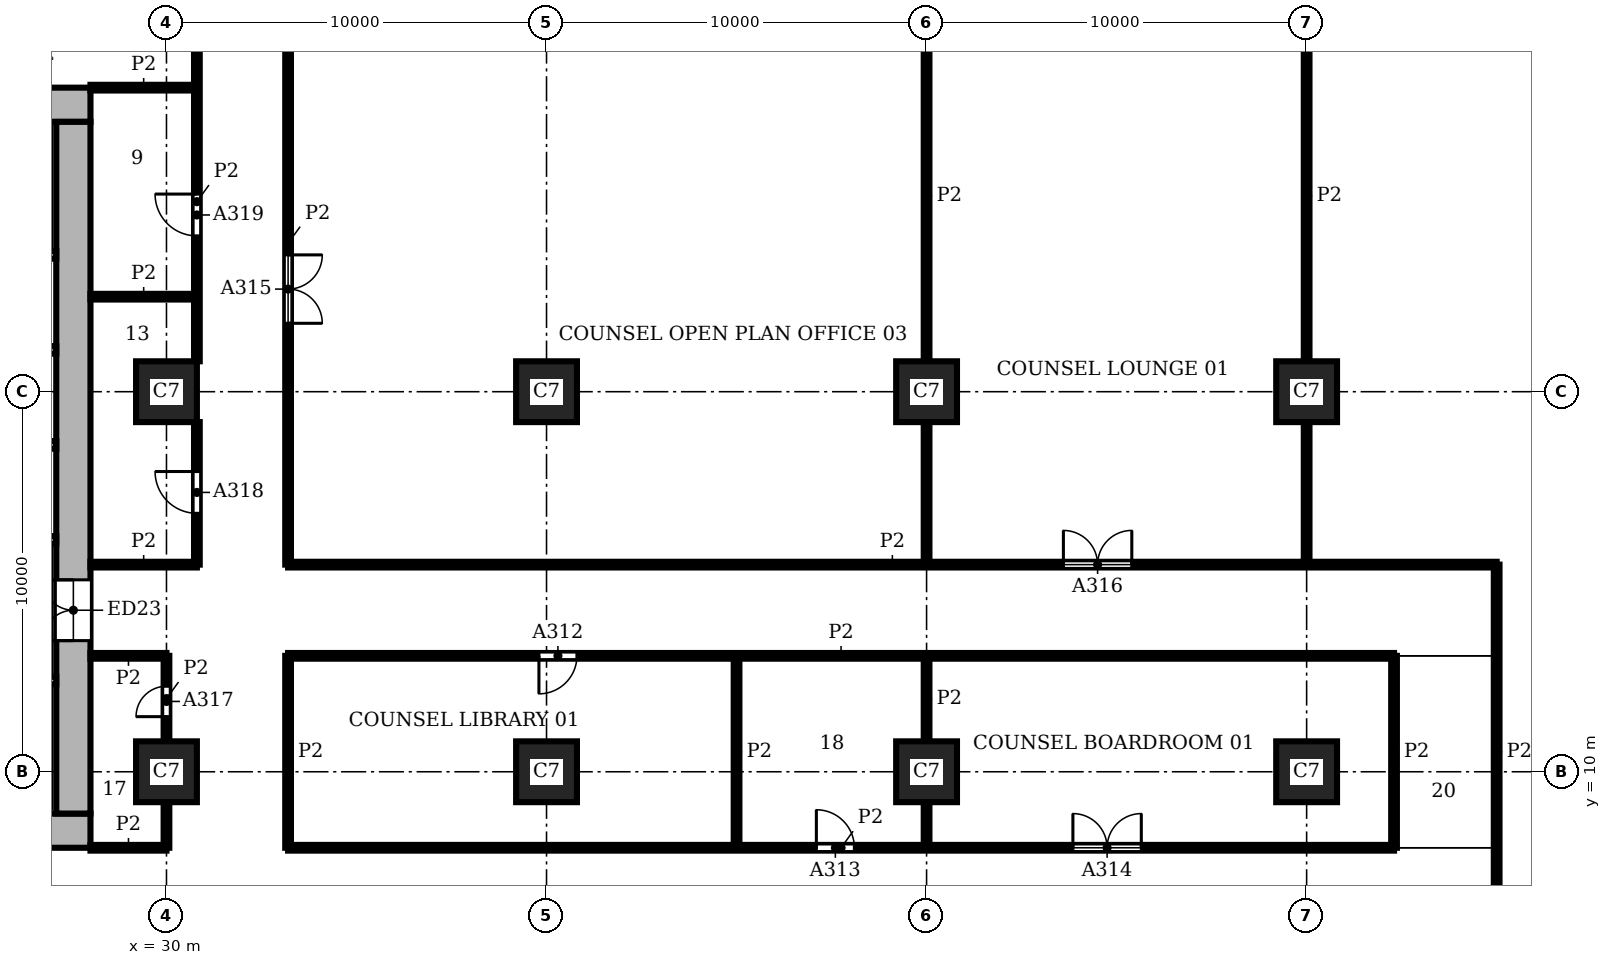
"""IFC4 building model, lengths in metres.
Left out: names, types, materials, properties, quantities, classifications, styles, units other than length and angle.
Written with IfcOpenShell. Run it as: python <this file> out.ifc"""

import sys

from ifc_helpers import new_model, si_unit, direction, frame, frame_2d, origin, origin_2d, place, context, subcontext, project, spatial, rectangle, extrude, element, fill, save


model = new_model("IFC4")
c1 = context("Model", 3, precision=1e-05, world=origin(), true_north=direction((0.0, 1.0)))
c2 = subcontext(c1, "Body", "Model", "MODEL_VIEW")
j1 = project(units=[si_unit("LENGTHUNIT", "METRE"), si_unit("PLANEANGLEUNIT", "RADIAN")], contexts=[c1])
p1 = place(None, origin())
s1 = spatial("IfcSite", under=j1, at=p1, CompositionType="ELEMENT")
p2 = place(p1, origin())
s2 = spatial("IfcBuilding", under=s1, at=p2, CompositionType="ELEMENT")
p3 = place(p2, frame((0.0, 0.0, 35.4)))
s3 = spatial("IfcBuildingStorey", under=s2, at=p3, CompositionType="ELEMENT", Elevation=35.4)
for number, where, z_axis, x_axis in (
    (1, (30.0, 10.0, 0.0), (0.0, 0.0, 1.0), (1.0, 0.0, 0.0)),
    (2, (30.0, 20.0, 0.0), (0.0, 0.0, 1.0), (1.0, 0.0, 0.0)),
    (3, (40.0, 10.0, 0.0), (0.0, 0.0, 1.0), (1.0, 0.0, 0.0)),
    (4, (40.0, 20.0, 0.0), (0.0, 0.0, 1.0), (1.0, 0.0, 0.0)),
    (5, (50.0, 10.0, 0.0), (0.0, 0.0, 1.0), (1.0, 0.0, 0.0)),
    (6, (50.0, 20.0, 0.0), (0.0, 0.0, 1.0), (1.0, 0.0, 0.0)),
    (7, (60.0, 10.0, 0.0), (0.0, 0.0, 1.0), (1.0, 0.0, 0.0)),
    (8, (60.0, 20.0, 0.0), (0.0, 0.0, 1.0), (1.0, 0.0, 0.0)),
):
    element("IfcColumn", number, at=place(p3, frame(where, z_axis=z_axis, x_axis=x_axis)), inside=s3, PredefinedType="COLUMN", context=c2, shape_type="SweptSolid", body=[
        extrude(rectangle(XDim=1.6, YDim=1.6, at=origin_2d()), origin(), (0.0, 0.0, 1.0), 3.9),
    ])
p4 = place(p3, frame((8.0, 8.45, 0.0), z_axis=(0.0, 0.0, 1.0), x_axis=(1.0, 0.0, 0.0)))
e9 = element("IfcWall", 9, at=p4, inside=s3, PredefinedType="SHEAR", context=c2, shape_type="SweptSolid", body=[
    extrude(rectangle(XDim=20.0, YDim=0.9, at=frame_2d((10.0, 0.0))), origin(), (0.0, 0.0, 1.0), 3.9),
])
p5 = place(p3, frame((27.55, 8.9, 0.0), z_axis=(0.0, 0.0, 1.0), x_axis=(0.0, 1.0, 0.0)))
e10 = element("IfcWall", 10, at=p5, inside=s3, PredefinedType="SHEAR", context=c2, shape_type="SweptSolid", body=[
    extrude(rectangle(XDim=18.2, YDim=0.9, at=frame_2d((9.1, 0.0))), origin(), (0.0, 0.0, 1.0), 3.9),
])
p6 = place(p5, frame((4.55, 0.0, 0.0)))
e11 = element("IfcOpeningElement", 11, at=p6, cuts=e10, PredefinedType="OPENING", context=c2, shape_type="SweptSolid", body=[
    extrude(rectangle(XDim=1.6, YDim=2.1, at=frame_2d((0.8, 1.05))), frame((0.0, 0.46, 0.0), z_axis=(0.0, -1.0, 0.0), x_axis=(1.0, 0.0, 0.0)), (0.0, 0.0, 1.0), 0.92),
])
p7 = place(p3, frame((28.0, 27.55, 0.0), z_axis=(0.0, 0.0, 1.0), x_axis=(-1.0, 0.0, 0.0)))
e12 = element("IfcWall", 12, at=p7, inside=s3, PredefinedType="SHEAR", context=c2, shape_type="SweptSolid", body=[
    extrude(rectangle(XDim=20.0, YDim=0.9, at=frame_2d((10.0, 0.0))), origin(), (0.0, 0.0, 1.0), 3.9),
])
p8 = place(p3, frame((13.8, 12.4, 0.0), z_axis=(0.0, 0.0, 1.0), x_axis=(1.0, 0.0, 0.0)))
e13 = element("IfcWall", 13, at=p8, inside=s3, PredefinedType="SHEAR", context=c2, shape_type="SweptSolid", body=[
    extrude(rectangle(XDim=13.3, YDim=0.2, at=frame_2d((6.65, 0.0))), origin(), (0.0, 0.0, 1.0), 3.58),
])
p9 = place(p8, frame((2.4, 0.0, 0.0)))
e14 = element("IfcOpeningElement", 14, at=p9, cuts=e13, PredefinedType="OPENING", context=c2, shape_type="SweptSolid", body=[
    extrude(rectangle(XDim=1.1, YDim=2.1, at=frame_2d((0.55, 1.05))), frame((0.0, 0.11, 0.0), z_axis=(0.0, -1.0, 0.0), x_axis=(1.0, 0.0, 0.0)), (0.0, 0.0, 1.0), 0.22),
])
p10 = place(p8, frame((4.9, 0.0, 0.0)))
e15 = element("IfcOpeningElement", 15, at=p10, cuts=e13, PredefinedType="OPENING", context=c2, shape_type="SweptSolid", body=[
    extrude(rectangle(XDim=1.1, YDim=2.1, at=frame_2d((0.55, 1.05))), frame((0.0, 0.11, 0.0), z_axis=(0.0, -1.0, 0.0), x_axis=(1.0, 0.0, 0.0)), (0.0, 0.0, 1.0), 0.22),
])
p11 = place(p8, frame((0.25, 0.0, 0.0)))
e16 = element("IfcOpeningElement", 16, at=p11, cuts=e13, PredefinedType="OPENING", context=c2, shape_type="SweptSolid", body=[
    extrude(rectangle(XDim=1.0, YDim=2.1, at=frame_2d((0.5, 1.05))), frame((0.0, 0.11, 0.0), z_axis=(0.0, -1.0, 0.0), x_axis=(1.0, 0.0, 0.0)), (0.0, 0.0, 1.0), 0.22),
])
for number, where, z_axis, x_axis in (
    (17, (24.3, 16.1, 0.0), (0.0, 0.0, 1.0), (1.0, 0.0, 0.0)),
    (18, (24.3, 18.6, 0.0), (0.0, 0.0, 1.0), (1.0, 0.0, 0.0)),
    (19, (24.3, 21.1, 0.0), (0.0, 0.0, 1.0), (1.0, 0.0, 0.0)),
):
    element("IfcWall", number, at=place(p3, frame(where, z_axis=z_axis, x_axis=x_axis)), inside=s3, PredefinedType="SHEAR", context=c2, shape_type="SweptSolid", body=[
        extrude(rectangle(XDim=2.8, YDim=0.2, at=frame_2d((1.4, 0.0))), origin(), (0.0, 0.0, 1.0), 3.58),
    ])
p12 = place(p3, frame((13.8, 23.6, 0.0), z_axis=(0.0, 0.0, 1.0), x_axis=(1.0, 0.0, 0.0)))
e20 = element("IfcWall", 20, at=p12, inside=s3, PredefinedType="SHEAR", context=c2, shape_type="SweptSolid", body=[
    extrude(rectangle(XDim=13.3, YDim=0.2, at=frame_2d((6.65, 0.0))), origin(), (0.0, 0.0, 1.0), 3.58),
])
p13 = place(p12, frame((2.4, 0.0, 0.0)))
e21 = element("IfcOpeningElement", 21, at=p13, cuts=e20, PredefinedType="OPENING", context=c2, shape_type="SweptSolid", body=[
    extrude(rectangle(XDim=1.1, YDim=2.1, at=frame_2d((0.55, 1.05))), frame((0.0, 0.11, 0.0), z_axis=(0.0, -1.0, 0.0), x_axis=(1.0, 0.0, 0.0)), (0.0, 0.0, 1.0), 0.22),
])
p14 = place(p12, frame((4.9, 0.0, 0.0)))
e22 = element("IfcOpeningElement", 22, at=p14, cuts=e20, PredefinedType="OPENING", context=c2, shape_type="SweptSolid", body=[
    extrude(rectangle(XDim=1.1, YDim=2.1, at=frame_2d((0.55, 1.05))), frame((0.0, 0.11, 0.0), z_axis=(0.0, -1.0, 0.0), x_axis=(1.0, 0.0, 0.0)), (0.0, 0.0, 1.0), 0.22),
])
p15 = place(p12, frame((0.25, 0.0, 0.0)))
e23 = element("IfcOpeningElement", 23, at=p15, cuts=e20, PredefinedType="OPENING", context=c2, shape_type="SweptSolid", body=[
    extrude(rectangle(XDim=1.0, YDim=2.1, at=frame_2d((0.5, 1.05))), frame((0.0, 0.11, 0.0), z_axis=(0.0, -1.0, 0.0), x_axis=(1.0, 0.0, 0.0)), (0.0, 0.0, 1.0), 0.22),
])
p16 = place(p3, frame((30.0, 8.0, 0.0), z_axis=(0.0, 0.0, 1.0), x_axis=(0.0, 1.0, 0.0)))
e24 = element("IfcWall", 24, at=p16, inside=s3, PredefinedType="PARTITIONING", context=c2, shape_type="SweptSolid", body=[
    extrude(rectangle(XDim=1.2, YDim=0.15, at=frame_2d((0.6, 0.0))), origin(), (0.0, 0.0, 1.0), 3.58),
])
p17 = place(p3, frame((30.0, 10.8, 0.0), z_axis=(0.0, 0.0, 1.0), x_axis=(0.0, 1.0, 0.0)))
e25 = element("IfcWall", 25, at=p17, inside=s3, PredefinedType="PARTITIONING", context=c2, shape_type="SweptSolid", body=[
    extrude(rectangle(XDim=2.25, YDim=0.15, at=frame_2d((1.125, 0.0))), origin(), (0.0, 0.0, 1.0), 3.58),
])
p18 = place(p17, frame((0.65, 0.0, 0.0)))
e26 = element("IfcOpeningElement", 26, at=p18, cuts=e25, PredefinedType="OPENING", context=c2, shape_type="SweptSolid", body=[
    extrude(rectangle(XDim=0.8, YDim=2.1, at=frame_2d((0.4, 1.05))), frame((0.0, 0.085, 0.0), z_axis=(0.0, -1.0, 0.0), x_axis=(1.0, 0.0, 0.0)), (0.0, 0.0, 1.0), 0.17),
])
p19 = place(p3, frame((30.8, 15.45, 0.0), z_axis=(0.0, 0.0, 1.0), x_axis=(0.0, 1.0, 0.0)))
e27 = element("IfcWall", 27, at=p19, inside=s3, PredefinedType="PARTITIONING", context=c2, shape_type="SweptSolid", body=[
    extrude(rectangle(XDim=3.75, YDim=0.15, at=frame_2d((1.875, 0.0))), origin(), (0.0, 0.0, 1.0), 3.58),
])
p20 = place(p19, frame((1.35, 0.0, 0.0)))
e28 = element("IfcOpeningElement", 28, at=p20, cuts=e27, PredefinedType="OPENING", context=c2, shape_type="SweptSolid", body=[
    extrude(rectangle(XDim=1.1, YDim=2.1, at=frame_2d((0.55, 1.05))), frame((0.0, 0.085, 0.0), z_axis=(0.0, -1.0, 0.0), x_axis=(1.0, 0.0, 0.0)), (0.0, 0.0, 1.0), 0.17),
])
p21 = place(p3, frame((30.8, 20.8, 0.0), z_axis=(0.0, 0.0, 1.0), x_axis=(0.0, 1.0, 0.0)))
e29 = element("IfcWall", 29, at=p21, inside=s3, PredefinedType="PARTITIONING", context=c2, shape_type="SweptSolid", body=[
    extrude(rectangle(XDim=8.4, YDim=0.15, at=frame_2d((4.2, 0.0))), origin(), (0.0, 0.0, 1.0), 3.58),
])
p22 = place(p21, frame((3.3, 0.0, 0.0)))
e30 = element("IfcOpeningElement", 30, at=p22, cuts=e29, PredefinedType="OPENING", context=c2, shape_type="SweptSolid", body=[
    extrude(rectangle(XDim=1.1, YDim=2.1, at=frame_2d((0.55, 1.05))), frame((0.0, 0.085, 0.0), z_axis=(0.0, -1.0, 0.0), x_axis=(1.0, 0.0, 0.0)), (0.0, 0.0, 1.0), 0.17),
])
p23 = place(p3, frame((33.2, 8.0, 0.0), z_axis=(0.0, 0.0, 1.0), x_axis=(0.0, 1.0, 0.0)))
e31 = element("IfcWall", 31, at=p23, inside=s3, PredefinedType="PARTITIONING", context=c2, shape_type="SweptSolid", body=[
    extrude(rectangle(XDim=5.05, YDim=0.15, at=frame_2d((2.525, 0.0))), origin(), (0.0, 0.0, 1.0), 3.58),
])
p24 = place(p3, frame((33.2, 15.45, 0.0), z_axis=(0.0, 0.0, 1.0), x_axis=(0.0, 1.0, 0.0)))
e32 = element("IfcWall", 32, at=p24, inside=s3, PredefinedType="PARTITIONING", context=c2, shape_type="SweptSolid", body=[
    extrude(rectangle(XDim=16.912, YDim=0.15, at=frame_2d((8.456, 0.0))), origin(), (0.0, 0.0, 1.0), 3.58),
])
p25 = place(p24, frame((6.35, 0.0, 0.0)))
e33 = element("IfcOpeningElement", 33, at=p25, cuts=e32, PredefinedType="OPENING", context=c2, shape_type="SweptSolid", body=[
    extrude(rectangle(XDim=1.8, YDim=2.1, at=frame_2d((0.9, 1.05))), frame((0.0, 0.085, 0.0), z_axis=(0.0, -1.0, 0.0), x_axis=(1.0, 0.0, 0.0)), (0.0, 0.0, 1.0), 0.17),
])
p26 = place(p3, frame((45.0, 8.0, 0.0), z_axis=(0.0, 0.0, 1.0), x_axis=(0.0, 1.0, 0.0)))
e34 = element("IfcWall", 34, at=p26, inside=s3, PredefinedType="PARTITIONING", context=c2, shape_type="SweptSolid", body=[
    extrude(rectangle(XDim=5.05, YDim=0.15, at=frame_2d((2.525, 0.0))), origin(), (0.0, 0.0, 1.0), 3.58),
])
p27 = place(p3, frame((50.0, 8.0, 0.0), z_axis=(0.0, 0.0, 1.0), x_axis=(0.0, 1.0, 0.0)))
e35 = element("IfcWall", 35, at=p27, inside=s3, PredefinedType="PARTITIONING", context=c2, shape_type="SweptSolid", body=[
    extrude(rectangle(XDim=1.2, YDim=0.15, at=frame_2d((0.6, 0.0))), origin(), (0.0, 0.0, 1.0), 3.58),
])
p28 = place(p3, frame((50.0, 10.8, 0.0), z_axis=(0.0, 0.0, 1.0), x_axis=(0.0, 1.0, 0.0)))
e36 = element("IfcWall", 36, at=p28, inside=s3, PredefinedType="PARTITIONING", context=c2, shape_type="SweptSolid", body=[
    extrude(rectangle(XDim=2.25, YDim=0.15, at=frame_2d((1.125, 0.0))), origin(), (0.0, 0.0, 1.0), 3.58),
])
p29 = place(p3, frame((50.0, 15.45, 0.0), z_axis=(0.0, 0.0, 1.0), x_axis=(0.0, 1.0, 0.0)))
e37 = element("IfcWall", 37, at=p29, inside=s3, PredefinedType="PARTITIONING", context=c2, shape_type="SweptSolid", body=[
    extrude(rectangle(XDim=3.75, YDim=0.15, at=frame_2d((1.875, 0.0))), origin(), (0.0, 0.0, 1.0), 3.58),
])
p30 = place(p3, frame((50.0, 20.8, 0.0), z_axis=(0.0, 0.0, 1.0), x_axis=(0.0, 1.0, 0.0)))
e38 = element("IfcWall", 38, at=p30, inside=s3, PredefinedType="PARTITIONING", context=c2, shape_type="SweptSolid", body=[
    extrude(rectangle(XDim=8.7, YDim=0.15, at=frame_2d((4.35, 0.0))), origin(), (0.0, 0.0, 1.0), 3.58),
])
p31 = place(p3, frame((60.0, 15.45, 0.0), z_axis=(0.0, 0.0, 1.0), x_axis=(0.0, 1.0, 0.0)))
e39 = element("IfcWall", 39, at=p31, inside=s3, PredefinedType="PARTITIONING", context=c2, shape_type="SweptSolid", body=[
    extrude(rectangle(XDim=3.75, YDim=0.15, at=frame_2d((1.875, 0.0))), origin(), (0.0, 0.0, 1.0), 3.58),
])
p32 = place(p3, frame((60.0, 20.8, 0.0), z_axis=(0.0, 0.0, 1.0), x_axis=(0.0, 1.0, 0.0)))
e40 = element("IfcWall", 40, at=p32, inside=s3, PredefinedType="PARTITIONING", context=c2, shape_type="SweptSolid", body=[
    extrude(rectangle(XDim=8.7, YDim=0.15, at=frame_2d((4.35, 0.0))), origin(), (0.0, 0.0, 1.0), 3.58),
])
p33 = place(p3, frame((62.3, 8.0, 0.0), z_axis=(0.0, 0.0, 1.0), x_axis=(0.0, 1.0, 0.0)))
e41 = element("IfcWall", 41, at=p33, inside=s3, PredefinedType="PARTITIONING", context=c2, shape_type="SweptSolid", body=[
    extrude(rectangle(XDim=5.05, YDim=0.15, at=frame_2d((2.525, 0.0))), origin(), (0.0, 0.0, 1.0), 3.58),
])
p34 = place(p3, frame((65.0, 5.6, 0.0), z_axis=(0.0, 0.0, 1.0), x_axis=(0.0, 1.0, 0.0)))
e42 = element("IfcWall", 42, at=p34, inside=s3, PredefinedType="PARTITIONING", context=c2, shape_type="SweptSolid", body=[
    extrude(rectangle(XDim=9.85, YDim=0.15, at=frame_2d((4.925, 0.0))), origin(), (0.0, 0.0, 1.0), 3.58),
])
p35 = place(p3, frame((28.0, 8.0, 0.0), z_axis=(0.0, 0.0, 1.0), x_axis=(1.0, 0.0, 0.0)))
e43 = element("IfcWall", 43, at=p35, inside=s3, PredefinedType="PARTITIONING", context=c2, shape_type="SweptSolid", body=[
    extrude(rectangle(XDim=2.0, YDim=0.15, at=frame_2d((1.0, 0.0))), origin(), (0.0, 0.0, 1.0), 3.58),
])
p36 = place(p3, frame((33.2, 8.0, 0.0), z_axis=(0.0, 0.0, 1.0), x_axis=(1.0, 0.0, 0.0)))
e44 = element("IfcWall", 44, at=p36, inside=s3, PredefinedType="PARTITIONING", context=c2, shape_type="SweptSolid", body=[
    extrude(rectangle(XDim=29.1, YDim=0.15, at=frame_2d((14.55, 0.0))), origin(), (0.0, 0.0, 1.0), 3.58),
])
p37 = place(p36, frame((13.9, 0.0, 0.0)))
e45 = element("IfcOpeningElement", 45, at=p37, cuts=e44, PredefinedType="OPENING", context=c2, shape_type="SweptSolid", body=[
    extrude(rectangle(XDim=1.0, YDim=2.1, at=frame_2d((0.5, 1.05))), frame((0.0, 0.085, 0.0), z_axis=(0.0, -1.0, 0.0), x_axis=(1.0, 0.0, 0.0)), (0.0, 0.0, 1.0), 0.17),
])
p38 = place(p36, frame((20.65, 0.0, 0.0)))
e46 = element("IfcOpeningElement", 46, at=p38, cuts=e44, PredefinedType="OPENING", context=c2, shape_type="SweptSolid", body=[
    extrude(rectangle(XDim=1.8, YDim=2.1, at=frame_2d((0.9, 1.05))), frame((0.0, 0.085, 0.0), z_axis=(0.0, -1.0, 0.0), x_axis=(1.0, 0.0, 0.0)), (0.0, 0.0, 1.0), 0.17),
])
p39 = place(p3, frame((28.0, 13.05, 0.0), z_axis=(0.0, 0.0, 1.0), x_axis=(1.0, 0.0, 0.0)))
e47 = element("IfcWall", 47, at=p39, inside=s3, PredefinedType="PARTITIONING", context=c2, shape_type="SweptSolid", body=[
    extrude(rectangle(XDim=2.0, YDim=0.15, at=frame_2d((1.0, 0.0))), origin(), (0.0, 0.0, 1.0), 3.58),
])
p40 = place(p3, frame((33.2, 13.05, 0.0), z_axis=(0.0, 0.0, 1.0), x_axis=(1.0, 0.0, 0.0)))
e48 = element("IfcWall", 48, at=p40, inside=s3, PredefinedType="PARTITIONING", context=c2, shape_type="SweptSolid", body=[
    extrude(rectangle(XDim=29.1, YDim=0.15, at=frame_2d((14.55, 0.0))), origin(), (0.0, 0.0, 1.0), 3.58),
])
p41 = place(p40, frame((6.6, 0.0, 0.0)))
e49 = element("IfcOpeningElement", 49, at=p41, cuts=e48, PredefinedType="OPENING", context=c2, shape_type="SweptSolid", body=[
    extrude(rectangle(XDim=1.0, YDim=2.1, at=frame_2d((0.5, 1.05))), frame((0.0, 0.085, 0.0), z_axis=(0.0, -1.0, 0.0), x_axis=(1.0, 0.0, 0.0)), (0.0, 0.0, 1.0), 0.17),
])
p42 = place(p3, frame((28.0, 15.45, 0.0), z_axis=(0.0, 0.0, 1.0), x_axis=(1.0, 0.0, 0.0)))
e50 = element("IfcWall", 50, at=p42, inside=s3, PredefinedType="PARTITIONING", context=c2, shape_type="SweptSolid", body=[
    extrude(rectangle(XDim=2.8, YDim=0.15, at=frame_2d((1.4, 0.0))), origin(), (0.0, 0.0, 1.0), 3.58),
])
p43 = place(p3, frame((33.2, 15.45, 0.0), z_axis=(0.0, 0.0, 1.0), x_axis=(1.0, 0.0, 0.0)))
e51 = element("IfcWall", 51, at=p43, inside=s3, PredefinedType="PARTITIONING", context=c2, shape_type="SweptSolid", body=[
    extrude(rectangle(XDim=31.8, YDim=0.15, at=frame_2d((15.9, 0.0))), origin(), (0.0, 0.0, 1.0), 3.58),
])
p44 = place(p43, frame((20.4, 0.0, 0.0)))
e52 = element("IfcOpeningElement", 52, at=p44, cuts=e51, PredefinedType="OPENING", context=c2, shape_type="SweptSolid", body=[
    extrude(rectangle(XDim=1.8, YDim=2.1, at=frame_2d((0.9, 1.05))), frame((0.0, 0.085, 0.0), z_axis=(0.0, -1.0, 0.0), x_axis=(1.0, 0.0, 0.0)), (0.0, 0.0, 1.0), 0.17),
])
for number, where, z_axis, x_axis in (
    (53, (28.0, 22.5, 0.0), (0.0, 0.0, 1.0), (1.0, 0.0, 0.0)),
    (54, (28.0, 28.0, 0.0), (0.0, 0.0, 1.0), (1.0, 0.0, 0.0)),
):
    element("IfcWall", number, at=place(p3, frame(where, z_axis=z_axis, x_axis=x_axis)), inside=s3, PredefinedType="PARTITIONING", context=c2, shape_type="SweptSolid", body=[
        extrude(rectangle(XDim=2.8, YDim=0.15, at=frame_2d((1.4, 0.0))), origin(), (0.0, 0.0, 1.0), 3.58),
    ])
p45 = place(p6, origin())
e55 = element("IfcDoor", 55, at=p45, inside=s3, OperationType="DOUBLE_DOOR_SINGLE_SWING", PredefinedType="DOOR", context=c2, shape_type="SweptSolid", body=[
    extrude(rectangle(XDim=1.6, YDim=2.1, at=frame_2d((0.8, 1.05))), frame((0.0, 0.025, 0.0), z_axis=(0.0, -1.0, 0.0), x_axis=(1.0, 0.0, 0.0)), (0.0, 0.0, 1.0), 0.05),
])
fill(e11, e55)
p46 = place(p41, frame((1.0, 0.0, 0.0), z_axis=(0.0, 0.0, 1.0), x_axis=(-1.0, 0.0, 0.0)))
e56 = element("IfcDoor", 56, at=p46, inside=s3, OperationType="SINGLE_SWING_RIGHT", PredefinedType="DOOR", context=c2, shape_type="SweptSolid", body=[
    extrude(rectangle(XDim=1.0, YDim=2.1, at=frame_2d((0.5, 1.05))), frame((0.0, 0.025, 0.0), z_axis=(0.0, -1.0, 0.0), x_axis=(1.0, 0.0, 0.0)), (0.0, 0.0, 1.0), 0.05),
])
fill(e49, e56)
p47 = place(p37, origin())
e57 = element("IfcDoor", 57, at=p47, inside=s3, OperationType="SINGLE_SWING_LEFT", PredefinedType="DOOR", context=c2, shape_type="SweptSolid", body=[
    extrude(rectangle(XDim=1.0, YDim=2.1, at=frame_2d((0.5, 1.05))), frame((0.0, 0.025, 0.0), z_axis=(0.0, -1.0, 0.0), x_axis=(1.0, 0.0, 0.0)), (0.0, 0.0, 1.0), 0.05),
])
fill(e45, e57)
p48 = place(p38, origin())
e58 = element("IfcDoor", 58, at=p48, inside=s3, OperationType="DOUBLE_DOOR_SINGLE_SWING", PredefinedType="DOOR", context=c2, shape_type="SweptSolid", body=[
    extrude(rectangle(XDim=1.8, YDim=2.1, at=frame_2d((0.9, 1.05))), frame((0.0, 0.025, 0.0), z_axis=(0.0, -1.0, 0.0), x_axis=(1.0, 0.0, 0.0)), (0.0, 0.0, 1.0), 0.05),
])
fill(e46, e58)
p49 = place(p25, frame((1.8, 0.0, 0.0), z_axis=(0.0, 0.0, 1.0), x_axis=(-1.0, 0.0, 0.0)))
e59 = element("IfcDoor", 59, at=p49, inside=s3, OperationType="DOUBLE_DOOR_SINGLE_SWING", PredefinedType="DOOR", context=c2, shape_type="SweptSolid", body=[
    extrude(rectangle(XDim=1.8, YDim=2.1, at=frame_2d((0.9, 1.05))), frame((0.0, 0.025, 0.0), z_axis=(0.0, -1.0, 0.0), x_axis=(1.0, 0.0, 0.0)), (0.0, 0.0, 1.0), 0.05),
])
fill(e33, e59)
p50 = place(p44, origin())
e60 = element("IfcDoor", 60, at=p50, inside=s3, OperationType="DOUBLE_DOOR_SINGLE_SWING", PredefinedType="DOOR", context=c2, shape_type="SweptSolid", body=[
    extrude(rectangle(XDim=1.8, YDim=2.1, at=frame_2d((0.9, 1.05))), frame((0.0, 0.025, 0.0), z_axis=(0.0, -1.0, 0.0), x_axis=(1.0, 0.0, 0.0)), (0.0, 0.0, 1.0), 0.05),
])
fill(e52, e60)
p51 = place(p18, origin())
e61 = element("IfcDoor", 61, at=p51, inside=s3, OperationType="SINGLE_SWING_LEFT", PredefinedType="DOOR", context=c2, shape_type="SweptSolid", body=[
    extrude(rectangle(XDim=0.8, YDim=2.1, at=frame_2d((0.4, 1.05))), frame((0.0, 0.025, 0.0), z_axis=(0.0, -1.0, 0.0), x_axis=(1.0, 0.0, 0.0)), (0.0, 0.0, 1.0), 0.05),
])
fill(e26, e61)
p52 = place(p20, origin())
e62 = element("IfcDoor", 62, at=p52, inside=s3, OperationType="SINGLE_SWING_RIGHT", PredefinedType="DOOR", context=c2, shape_type="SweptSolid", body=[
    extrude(rectangle(XDim=1.1, YDim=2.1, at=frame_2d((0.55, 1.05))), frame((0.0, 0.025, 0.0), z_axis=(0.0, -1.0, 0.0), x_axis=(1.0, 0.0, 0.0)), (0.0, 0.0, 1.0), 0.05),
])
fill(e28, e62)
p53 = place(p22, origin())
e63 = element("IfcDoor", 63, at=p53, inside=s3, OperationType="SINGLE_SWING_RIGHT", PredefinedType="DOOR", context=c2, shape_type="SweptSolid", body=[
    extrude(rectangle(XDim=1.1, YDim=2.1, at=frame_2d((0.55, 1.05))), frame((0.0, 0.025, 0.0), z_axis=(0.0, -1.0, 0.0), x_axis=(1.0, 0.0, 0.0)), (0.0, 0.0, 1.0), 0.05),
])
fill(e30, e63)
save(model, sys.argv[1])
